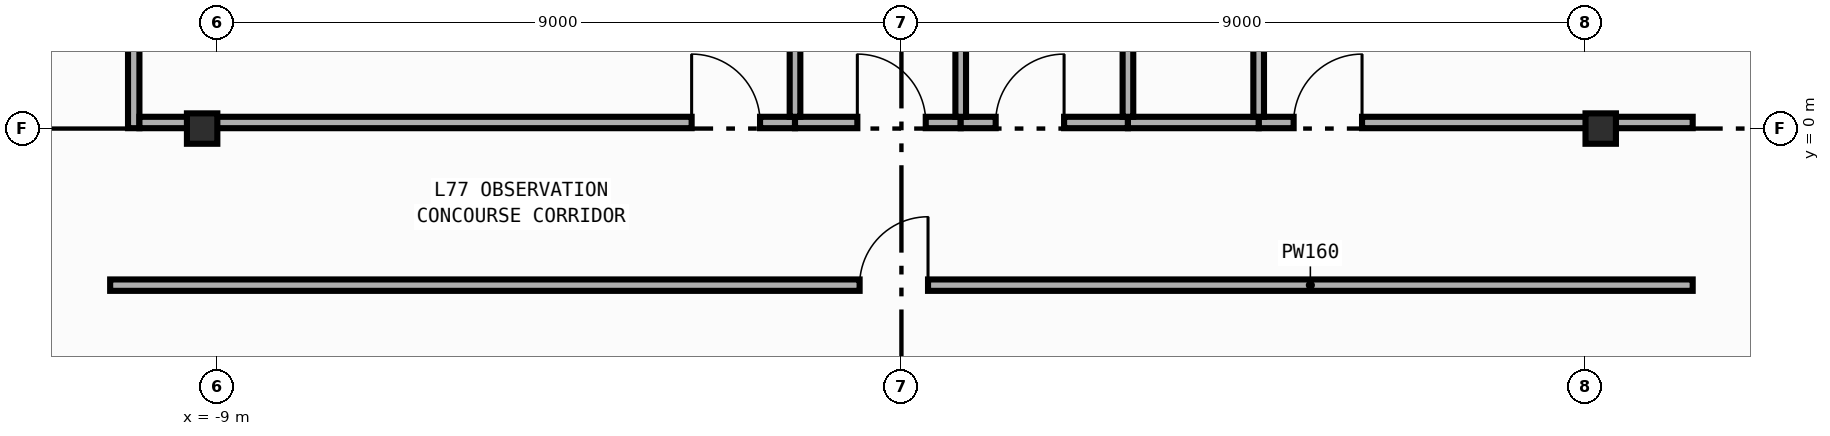
"""IFC4 building model, lengths in metres.
Left out: names, types, materials, properties, quantities, classifications, styles, units other than length and angle.
Written with IfcOpenShell. Run it as: python <this file> out.ifc"""

import sys

from ifc_helpers import new_model, si_unit, direction, frame, frame_2d, origin, origin_2d, place, context, subcontext, project, spatial, rectangle, i_section, extrude, element, fill, save


model = new_model("IFC4")
c1 = context("Model", 3, precision=1e-05, world=origin(), true_north=direction((0.0, 1.0)))
c2 = subcontext(c1, "Body", "Model", "MODEL_VIEW")
j1 = project(units=[si_unit("LENGTHUNIT", "METRE"), si_unit("PLANEANGLEUNIT", "RADIAN")], contexts=[c1])
p1 = place(None, origin())
s1 = spatial("IfcSite", under=j1, at=p1, CompositionType="ELEMENT")
p2 = place(p1, origin())
s2 = spatial("IfcBuilding", under=s1, at=p2, CompositionType="ELEMENT")
p3 = place(p2, frame((0.0, 0.0, 320.4)))
s3 = spatial("IfcBuildingStorey", under=s2, at=p3, CompositionType="ELEMENT", Elevation=320.4)
for number, where, z_axis, x_axis in (
    (1, (-9.2, 0.0, 0.0), (0.0, 0.0, 1.0), (1.0, 0.0, 0.0)),
    (2, (9.2, 0.0, 0.0), (0.0, 0.0, 1.0), (1.0, 0.0, 0.0)),
):
    element("IfcColumn", number, at=place(p3, frame(where, z_axis=z_axis, x_axis=x_axis)), inside=s3, PredefinedType="COLUMN", context=c2, shape_type="SweptSolid", body=[
        extrude(i_section(OverallWidth=0.4, OverallDepth=0.4, WebThickness=0.013, FlangeThickness=0.021, FilletRadius=0.022, at=origin_2d()), origin(), (0.0, 0.0, 1.0), 4.8),
    ])
p4 = place(p3, frame((-10.1, 0.005, 0.0), z_axis=(0.0, 0.0, 1.0), x_axis=(0.0, 1.0, 0.0)))
e3 = element("IfcWall", 3, at=p4, inside=s3, PredefinedType="PARTITIONING", context=c2, shape_type="SweptSolid", body=[
    extrude(rectangle(XDim=10.735, YDim=0.15, at=frame_2d((5.368, 0.0))), origin(), (0.0, 0.0, 1.0), 4.45),
])
p5 = place(p4, frame((4.917, 0.0, 0.0)))
e4 = element("IfcOpeningElement", 4, at=p5, cuts=e3, PredefinedType="OPENING", context=c2, shape_type="SweptSolid", body=[
    extrude(rectangle(XDim=0.9, YDim=2.15, at=frame_2d((0.45, 1.075))), frame((0.0, 0.085, 0.0), z_axis=(0.0, -1.0, 0.0), x_axis=(1.0, 0.0, 0.0)), (0.0, 0.0, 1.0), 0.17),
])
p6 = place(p3, frame((-10.41, -2.06, 0.0), z_axis=(0.0, 0.0, 1.0), x_axis=(1.0, 0.0, 0.0)))
e5 = element("IfcWall", 5, at=p6, inside=s3, PredefinedType="PARTITIONING", context=c2, shape_type="SweptSolid", body=[
    extrude(rectangle(XDim=20.82, YDim=0.15, at=frame_2d((10.41, 0.0))), origin(), (0.0, 0.0, 1.0), 4.45),
])
p7 = place(p6, frame((9.86, 0.0, 0.0)))
e6 = element("IfcOpeningElement", 6, at=p7, cuts=e5, PredefinedType="OPENING", context=c2, shape_type="SweptSolid", body=[
    extrude(rectangle(XDim=0.9, YDim=2.15, at=frame_2d((0.45, 1.075))), frame((0.0, 0.085, 0.0), z_axis=(0.0, -1.0, 0.0), x_axis=(1.0, 0.0, 0.0)), (0.0, 0.0, 1.0), 0.17),
])
p8 = place(p3, frame((-10.025, 0.08, 0.0), z_axis=(0.0, 0.0, 1.0), x_axis=(1.0, 0.0, 0.0)))
e7 = element("IfcWall", 7, at=p8, inside=s3, PredefinedType="PARTITIONING", context=c2, shape_type="SweptSolid", body=[
    extrude(rectangle(XDim=8.625, YDim=0.15, at=frame_2d((4.312, 0.0))), origin(), (0.0, 0.0, 1.0), 3.55),
])
p9 = place(p8, frame((7.265, 0.0, 0.0)))
e8 = element("IfcOpeningElement", 8, at=p9, cuts=e7, PredefinedType="OPENING", context=c2, shape_type="SweptSolid", body=[
    extrude(rectangle(XDim=0.9, YDim=2.15, at=frame_2d((0.45, 1.075))), frame((0.0, 0.085, 0.0), z_axis=(0.0, -1.0, 0.0), x_axis=(1.0, 0.0, 0.0)), (0.0, 0.0, 1.0), 0.17),
])
p10 = place(p3, frame((4.7, 0.08, 0.0), z_axis=(0.0, 0.0, 1.0), x_axis=(1.0, 0.0, 0.0)))
e9 = element("IfcWall", 9, at=p10, inside=s3, PredefinedType="PARTITIONING", context=c2, shape_type="SweptSolid", body=[
    extrude(rectangle(XDim=5.71, YDim=0.15, at=frame_2d((2.855, 0.0))), origin(), (0.0, 0.0, 1.0), 3.55),
])
p11 = place(p10, frame((0.46, 0.0, 0.0)))
e10 = element("IfcOpeningElement", 10, at=p11, cuts=e9, PredefinedType="OPENING", context=c2, shape_type="SweptSolid", body=[
    extrude(rectangle(XDim=0.9, YDim=2.15, at=frame_2d((0.45, 1.075))), frame((0.0, 0.085, 0.0), z_axis=(0.0, -1.0, 0.0), x_axis=(1.0, 0.0, 0.0)), (0.0, 0.0, 1.0), 0.17),
])
p12 = place(p3, frame((-1.4, 0.08, 0.0), z_axis=(0.0, 0.0, 1.0), x_axis=(1.0, 0.0, 0.0)))
e11 = element("IfcWall", 11, at=p12, inside=s3, PredefinedType="PARTITIONING", context=c2, shape_type="SweptSolid", body=[
    extrude(rectangle(XDim=2.18, YDim=0.15, at=frame_2d((1.09, 0.0))), origin(), (0.0, 0.0, 1.0), 3.55),
])
p13 = place(p12, frame((0.82, 0.0, 0.0)))
e12 = element("IfcOpeningElement", 12, at=p13, cuts=e11, PredefinedType="OPENING", context=c2, shape_type="SweptSolid", body=[
    extrude(rectangle(XDim=0.9, YDim=2.15, at=frame_2d((0.45, 1.075))), frame((0.0, 0.085, 0.0), z_axis=(0.0, -1.0, 0.0), x_axis=(1.0, 0.0, 0.0)), (0.0, 0.0, 1.0), 0.17),
])
p14 = place(p3, frame((0.78, 0.08, 0.0), z_axis=(0.0, 0.0, 1.0), x_axis=(1.0, 0.0, 0.0)))
e13 = element("IfcWall", 13, at=p14, inside=s3, PredefinedType="PARTITIONING", context=c2, shape_type="SweptSolid", body=[
    extrude(rectangle(XDim=2.2, YDim=0.15, at=frame_2d((1.1, 0.0))), origin(), (0.0, 0.0, 1.0), 3.55),
])
p15 = place(p14, frame((0.46, 0.0, 0.0)))
e14 = element("IfcOpeningElement", 14, at=p15, cuts=e13, PredefinedType="OPENING", context=c2, shape_type="SweptSolid", body=[
    extrude(rectangle(XDim=0.9, YDim=2.15, at=frame_2d((0.45, 1.075))), frame((0.0, 0.085, 0.0), z_axis=(0.0, -1.0, 0.0), x_axis=(1.0, 0.0, 0.0)), (0.0, 0.0, 1.0), 0.17),
])
p16 = place(p3, frame((2.98, 0.08, 0.0), z_axis=(0.0, 0.0, 1.0), x_axis=(1.0, 0.0, 0.0)))
e15 = element("IfcWall", 15, at=p16, inside=s3, PredefinedType="PARTITIONING", context=c2, shape_type="SweptSolid", body=[
    extrude(rectangle(XDim=1.72, YDim=0.15, at=frame_2d((0.86, 0.0))), origin(), (0.0, 0.0, 1.0), 3.55),
])
p17 = place(p3, frame((-1.4, 0.155, 0.0), z_axis=(0.0, 0.0, 1.0), x_axis=(0.0, 1.0, 0.0)))
e16 = element("IfcWall", 16, at=p17, inside=s3, PredefinedType="PARTITIONING", context=c2, shape_type="SweptSolid", body=[
    extrude(rectangle(XDim=8.885, YDim=0.14, at=frame_2d((4.442, 0.0))), origin(), (0.0, 0.0, 1.0), 4.45),
])
p18 = place(p3, frame((4.7, 0.155, 0.0), z_axis=(0.0, 0.0, 1.0), x_axis=(0.0, 1.0, 0.0)))
e17 = element("IfcWall", 17, at=p18, inside=s3, PredefinedType="PARTITIONING", context=c2, shape_type="SweptSolid", body=[
    extrude(rectangle(XDim=5.085, YDim=0.14, at=frame_2d((2.542, 0.0))), origin(), (0.0, 0.0, 1.0), 4.1),
])
p19 = place(p18, frame((3.775, 0.0, 0.0)))
e18 = element("IfcOpeningElement", 18, at=p19, cuts=e17, PredefinedType="OPENING", context=c2, shape_type="SweptSolid", body=[
    extrude(rectangle(XDim=0.85, YDim=2.1, at=frame_2d((0.425, 1.05))), frame((0.0, 0.08, 0.0), z_axis=(0.0, -1.0, 0.0), x_axis=(1.0, 0.0, 0.0)), (0.0, 0.0, 1.0), 0.16),
])
p20 = place(p3, frame((0.78, 0.155, 0.0), z_axis=(0.0, 0.0, 1.0), x_axis=(0.0, 1.0, 0.0)))
e19 = element("IfcWall", 19, at=p20, inside=s3, PredefinedType="PARTITIONING", context=c2, shape_type="SweptSolid", body=[
    extrude(rectangle(XDim=8.885, YDim=0.14, at=frame_2d((4.442, 0.0))), origin(), (0.0, 0.0, 1.0), 4.45),
])
p21 = place(p3, frame((2.98, 0.155, 0.0), z_axis=(0.0, 0.0, 1.0), x_axis=(0.0, 1.0, 0.0)))
e20 = element("IfcWall", 20, at=p21, inside=s3, PredefinedType="PARTITIONING", context=c2, shape_type="SweptSolid", body=[
    extrude(rectangle(XDim=5.085, YDim=0.14, at=frame_2d((2.542, 0.0))), origin(), (0.0, 0.0, 1.0), 4.45),
])
p22 = place(p7, origin())
e21 = element("IfcDoor", 21, at=p22, inside=s3, OperationType="SINGLE_SWING_RIGHT", PredefinedType="DOOR", context=c2, shape_type="SweptSolid", body=[
    extrude(rectangle(XDim=0.9, YDim=2.15, at=frame_2d((0.45, 1.075))), frame((0.0, 0.025, 0.0), z_axis=(0.0, -1.0, 0.0), x_axis=(1.0, 0.0, 0.0)), (0.0, 0.0, 1.0), 0.05),
])
fill(e6, e21)
p23 = place(p9, origin())
e22 = element("IfcDoor", 22, at=p23, inside=s3, OperationType="SINGLE_SWING_LEFT", PredefinedType="DOOR", context=c2, shape_type="SweptSolid", body=[
    extrude(rectangle(XDim=0.9, YDim=2.15, at=frame_2d((0.45, 1.075))), frame((0.0, 0.025, 0.0), z_axis=(0.0, -1.0, 0.0), x_axis=(1.0, 0.0, 0.0)), (0.0, 0.0, 1.0), 0.05),
])
fill(e8, e22)
p24 = place(p11, origin())
e23 = element("IfcDoor", 23, at=p24, inside=s3, OperationType="SINGLE_SWING_RIGHT", PredefinedType="DOOR", context=c2, shape_type="SweptSolid", body=[
    extrude(rectangle(XDim=0.9, YDim=2.15, at=frame_2d((0.45, 1.075))), frame((0.0, 0.025, 0.0), z_axis=(0.0, -1.0, 0.0), x_axis=(1.0, 0.0, 0.0)), (0.0, 0.0, 1.0), 0.05),
])
fill(e10, e23)
p25 = place(p13, origin())
e24 = element("IfcDoor", 24, at=p25, inside=s3, OperationType="SINGLE_SWING_LEFT", PredefinedType="DOOR", context=c2, shape_type="SweptSolid", body=[
    extrude(rectangle(XDim=0.9, YDim=2.15, at=frame_2d((0.45, 1.075))), frame((0.0, 0.025, 0.0), z_axis=(0.0, -1.0, 0.0), x_axis=(1.0, 0.0, 0.0)), (0.0, 0.0, 1.0), 0.05),
])
fill(e12, e24)
p26 = place(p15, origin())
e25 = element("IfcDoor", 25, at=p26, inside=s3, OperationType="SINGLE_SWING_RIGHT", PredefinedType="DOOR", context=c2, shape_type="SweptSolid", body=[
    extrude(rectangle(XDim=0.9, YDim=2.15, at=frame_2d((0.45, 1.075))), frame((0.0, 0.025, 0.0), z_axis=(0.0, -1.0, 0.0), x_axis=(1.0, 0.0, 0.0)), (0.0, 0.0, 1.0), 0.05),
])
fill(e14, e25)
save(model, sys.argv[1])
